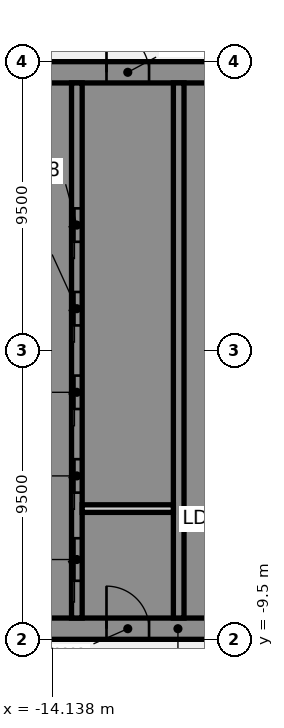
"""IFC4 building model, lengths in metres.
Left out: names, types, materials, properties, quantities, classifications, styles, units other than length and angle.
Written with IfcOpenShell. Run it as: python <this file> out.ifc"""

import sys

from ifc_helpers import new_model, si_unit, direction, frame, frame_2d, origin, place, context, subcontext, project, spatial, polyline, rectangle, outline, extrude, element, fill, save


model = new_model("IFC4")
c1 = context("Model", 3, precision=1e-05, world=origin(), true_north=direction((0.0, 1.0)))
c2 = subcontext(c1, "Body", "Model", "MODEL_VIEW")
j1 = project(units=[si_unit("LENGTHUNIT", "METRE"), si_unit("PLANEANGLEUNIT", "RADIAN")], contexts=[c1])
p1 = place(None, origin())
s1 = spatial("IfcSite", under=j1, at=p1, CompositionType="ELEMENT")
p2 = place(p1, origin())
s2 = spatial("IfcBuilding", under=s1, at=p2, CompositionType="ELEMENT")
p3 = place(p2, frame((0.0, 0.0, 79.0)))
s3 = spatial("IfcBuildingStorey", under=s2, at=p3, CompositionType="ELEMENT", Elevation=79.0)
p4 = place(p3, frame((-16.5, -9.15, 0.0), z_axis=(0.0, 0.0, 1.0), x_axis=(1.0, 0.0, 0.0)))
e1 = element("IfcWall", 1, at=p4, inside=s3, PredefinedType="SHEAR", context=c2, shape_type="SweptSolid", body=[
    extrude(rectangle(XDim=13.0, YDim=0.7, at=frame_2d((6.5, 0.0))), origin(), (0.0, 0.0, 1.0), 4.36),
])
p5 = place(p4, frame((4.15, 0.0, 0.0)))
e2 = element("IfcOpeningElement", 2, at=p5, cuts=e1, PredefinedType="OPENING", context=c2, shape_type="SweptSolid", body=[
    extrude(rectangle(XDim=1.4, YDim=2.1, at=frame_2d((0.7, 1.05))), frame((0.0, 0.36, 0.0), z_axis=(0.0, -1.0, 0.0), x_axis=(1.0, 0.0, 0.0)), (0.0, 0.0, 1.0), 0.72),
])
p6 = place(p4, frame((10.125, 0.0, 0.0)))
e3 = element("IfcOpeningElement", 3, at=p6, cuts=e1, PredefinedType="OPENING", context=c2, shape_type="SweptSolid", body=[
    extrude(rectangle(XDim=1.4, YDim=2.1, at=frame_2d((0.7, 1.05))), frame((0.0, 0.36, 0.0), z_axis=(0.0, -1.0, 0.0), x_axis=(1.0, 0.0, 0.0)), (0.0, 0.0, 1.0), 0.72),
])
p7 = place(p3, origin())
e4 = element("IfcWall", 4, at=p7, inside=s3, PredefinedType="SHEAR", context=c2, shape_type="SweptSolid", body=[
    extrude(outline(polyline([(-13.5, -8.8), (-13.5, -8.125), (-15.8, -8.125), (-15.8, -5.625), (-13.5, -5.625), (-13.5, -5.375), (-15.8, -5.375), (-15.8, -2.875), (-13.5, -2.875), (-13.5, -2.625), (-15.8, -2.625), (-15.8, -0.125), (-13.5, -0.125), (-13.5, 0.125), (-15.8, 0.125), (-15.8, 2.625), (-13.5, 2.625), (-13.5, 2.875), (-15.8, 2.875), (-15.8, 5.375), (-13.5, 5.375), (-13.5, 5.625), (-15.8, 5.625), (-15.8, 8.125), (-13.5, 8.125), (-13.5, 8.8), (-15.8, 8.8), (-16.5, 8.8), (-16.5, -8.8), (-15.8, -8.8), (-13.5, -8.8)])), origin(), (0.0, 0.0, 1.0), 4.36),
])
p8 = place(p3, frame((-16.5, 9.15, 0.0), z_axis=(0.0, 0.0, 1.0), x_axis=(1.0, 0.0, 0.0)))
e5 = element("IfcWall", 5, at=p8, inside=s3, PredefinedType="SHEAR", context=c2, shape_type="SweptSolid", body=[
    extrude(rectangle(XDim=13.0, YDim=0.7, at=frame_2d((6.5, 0.0))), origin(), (0.0, 0.0, 1.0), 4.36),
])
p9 = place(p8, frame((4.15, 0.0, 0.0)))
e6 = element("IfcOpeningElement", 6, at=p9, cuts=e5, PredefinedType="OPENING", context=c2, shape_type="SweptSolid", body=[
    extrude(rectangle(XDim=1.4, YDim=2.1, at=frame_2d((0.7, 1.05))), frame((0.0, 0.36, 0.0), z_axis=(0.0, -1.0, 0.0), x_axis=(1.0, 0.0, 0.0)), (0.0, 0.0, 1.0), 0.72),
])
p10 = place(p3, origin())
e7 = element("IfcWall", 7, at=p10, inside=s3, PredefinedType="SHEAR", context=c2, shape_type="SweptSolid", body=[
    extrude(outline(polyline([(-9.8, -5.375), (-9.8, -5.625), (-7.5, -5.625), (-7.15, -5.625), (-7.15, 8.8), (-7.5, 8.8), (-9.8, 8.8), (-9.8, 8.125), (-7.5, 8.125), (-7.5, 5.625), (-9.8, 5.625), (-9.8, 5.375), (-7.5, 5.375), (-7.5, 2.875), (-9.8, 2.875), (-9.8, 2.625), (-7.5, 2.625), (-7.5, 0.125), (-9.8, 0.125), (-9.8, -0.125), (-7.5, -0.125), (-7.5, -2.625), (-9.8, -2.625), (-9.8, -2.875), (-7.5, -2.875), (-7.5, -5.375), (-9.8, -5.375)])), origin(), (0.0, 0.0, 1.0), 4.36),
])
p11 = place(p3, origin())
e8 = element("IfcWall", 8, at=p11, inside=s3, PredefinedType="SHEAR", context=c2, shape_type="SweptSolid", body=[
    extrude(outline(polyline([(-7.5, -8.125), (-9.55, -8.125), (-9.55, -5.625), (-9.8, -5.625), (-9.8, -8.125), (-9.8, -8.8), (-7.5, -8.8), (-7.5, -8.125)])), origin(), (0.0, 0.0, 1.0), 4.36),
])
p12 = place(p3, frame((-13.325, -8.8, 0.0), z_axis=(0.0, 0.0, 1.0), x_axis=(0.0, 1.0, 0.0)))
e9 = element("IfcWall", 9, at=p12, inside=s3, PredefinedType="SHEAR", context=c2, shape_type="SweptSolid", body=[
    extrude(rectangle(XDim=17.6, YDim=0.35, at=frame_2d((8.8, 0.0))), origin(), (0.0, 0.0, 1.0), 4.36),
])
p13 = place(p12, frame((1.225, 0.0, 0.0)))
e10 = element("IfcOpeningElement", 10, at=p13, cuts=e9, PredefinedType="OPENING", context=c2, shape_type="SweptSolid", body=[
    extrude(rectangle(XDim=1.4, YDim=2.1, at=frame_2d((0.7, 1.05))), frame((0.0, 0.185, 0.0), z_axis=(0.0, -1.0, 0.0), x_axis=(1.0, 0.0, 0.0)), (0.0, 0.0, 1.0), 0.37),
])
p14 = place(p12, frame((4.125, 0.0, 0.0)))
e11 = element("IfcOpeningElement", 11, at=p14, cuts=e9, PredefinedType="OPENING", context=c2, shape_type="SweptSolid", body=[
    extrude(rectangle(XDim=1.1, YDim=2.1, at=frame_2d((0.55, 1.05))), frame((0.0, 0.185, 0.0), z_axis=(0.0, -1.0, 0.0), x_axis=(1.0, 0.0, 0.0)), (0.0, 0.0, 1.0), 0.37),
])
p15 = place(p12, frame((6.875, 0.0, 0.0)))
e12 = element("IfcOpeningElement", 12, at=p15, cuts=e9, PredefinedType="OPENING", context=c2, shape_type="SweptSolid", body=[
    extrude(rectangle(XDim=1.1, YDim=2.1, at=frame_2d((0.55, 1.05))), frame((0.0, 0.185, 0.0), z_axis=(0.0, -1.0, 0.0), x_axis=(1.0, 0.0, 0.0)), (0.0, 0.0, 1.0), 0.37),
])
p16 = place(p12, frame((9.625, 0.0, 0.0)))
e13 = element("IfcOpeningElement", 13, at=p16, cuts=e9, PredefinedType="OPENING", context=c2, shape_type="SweptSolid", body=[
    extrude(rectangle(XDim=1.1, YDim=2.1, at=frame_2d((0.55, 1.05))), frame((0.0, 0.185, 0.0), z_axis=(0.0, -1.0, 0.0), x_axis=(1.0, 0.0, 0.0)), (0.0, 0.0, 1.0), 0.37),
])
p17 = place(p12, frame((12.375, 0.0, 0.0)))
e14 = element("IfcOpeningElement", 14, at=p17, cuts=e9, PredefinedType="OPENING", context=c2, shape_type="SweptSolid", body=[
    extrude(rectangle(XDim=1.1, YDim=2.1, at=frame_2d((0.55, 1.05))), frame((0.0, 0.185, 0.0), z_axis=(0.0, -1.0, 0.0), x_axis=(1.0, 0.0, 0.0)), (0.0, 0.0, 1.0), 0.37),
])
p18 = place(p3, frame((-9.975, -8.8, 0.0), z_axis=(0.0, 0.0, 1.0), x_axis=(0.0, 1.0, 0.0)))
e15 = element("IfcWall", 15, at=p18, inside=s3, PredefinedType="SHEAR", context=c2, shape_type="SweptSolid", body=[
    extrude(rectangle(XDim=17.6, YDim=0.35, at=frame_2d((8.8, 0.0))), origin(), (0.0, 0.0, 1.0), 4.36),
])
p19 = place(p3, frame((-13.15, -5.2, 0.0), z_axis=(0.0, 0.0, 1.0), x_axis=(1.0, 0.0, 0.0)))
e16 = element("IfcWall", 16, at=p19, inside=s3, PredefinedType="PARTITIONING", context=c2, shape_type="SweptSolid", body=[
    extrude(rectangle(XDim=3.0, YDim=0.25, at=frame_2d((1.5, 0.0))), origin(), (0.0, 0.0, 1.0), 4.36),
])
p20 = place(p5, origin())
e17 = element("IfcDoor", 17, at=p20, inside=s3, OperationType="SINGLE_SWING_LEFT", PredefinedType="DOOR", context=c2, shape_type="SweptSolid", body=[
    extrude(rectangle(XDim=1.4, YDim=2.1, at=frame_2d((0.7, 1.05))), frame((0.0, 0.025, 0.0), z_axis=(0.0, -1.0, 0.0), x_axis=(1.0, 0.0, 0.0)), (0.0, 0.0, 1.0), 0.05),
])
fill(e2, e17)
p21 = place(p13, origin())
e18 = element("IfcDoor", 18, at=p21, inside=s3, OperationType="SLIDING_TO_LEFT", PredefinedType="DOOR", context=c2, shape_type="SweptSolid", body=[
    extrude(rectangle(XDim=1.4, YDim=2.1, at=frame_2d((0.7, 1.05))), frame((0.0, 0.025, 0.0), z_axis=(0.0, -1.0, 0.0), x_axis=(1.0, 0.0, 0.0)), (0.0, 0.0, 1.0), 0.05),
])
fill(e10, e18)
p22 = place(p14, origin())
e19 = element("IfcDoor", 19, at=p22, inside=s3, OperationType="SLIDING_TO_LEFT", PredefinedType="DOOR", context=c2, shape_type="SweptSolid", body=[
    extrude(rectangle(XDim=1.1, YDim=2.1, at=frame_2d((0.55, 1.05))), frame((0.0, 0.025, 0.0), z_axis=(0.0, -1.0, 0.0), x_axis=(1.0, 0.0, 0.0)), (0.0, 0.0, 1.0), 0.05),
])
fill(e11, e19)
p23 = place(p15, origin())
e20 = element("IfcDoor", 20, at=p23, inside=s3, OperationType="SLIDING_TO_LEFT", PredefinedType="DOOR", context=c2, shape_type="SweptSolid", body=[
    extrude(rectangle(XDim=1.1, YDim=2.1, at=frame_2d((0.55, 1.05))), frame((0.0, 0.025, 0.0), z_axis=(0.0, -1.0, 0.0), x_axis=(1.0, 0.0, 0.0)), (0.0, 0.0, 1.0), 0.05),
])
fill(e12, e20)
p24 = place(p16, origin())
e21 = element("IfcDoor", 21, at=p24, inside=s3, OperationType="SLIDING_TO_LEFT", PredefinedType="DOOR", context=c2, shape_type="SweptSolid", body=[
    extrude(rectangle(XDim=1.1, YDim=2.1, at=frame_2d((0.55, 1.05))), frame((0.0, 0.025, 0.0), z_axis=(0.0, -1.0, 0.0), x_axis=(1.0, 0.0, 0.0)), (0.0, 0.0, 1.0), 0.05),
])
fill(e13, e21)
p25 = place(p17, origin())
e22 = element("IfcDoor", 22, at=p25, inside=s3, OperationType="SLIDING_TO_LEFT", PredefinedType="DOOR", context=c2, shape_type="SweptSolid", body=[
    extrude(rectangle(XDim=1.1, YDim=2.1, at=frame_2d((0.55, 1.05))), frame((0.0, 0.025, 0.0), z_axis=(0.0, -1.0, 0.0), x_axis=(1.0, 0.0, 0.0)), (0.0, 0.0, 1.0), 0.05),
])
fill(e14, e22)
p26 = place(p9, origin())
e23 = element("IfcDoor", 23, at=p26, inside=s3, OperationType="SINGLE_SWING_LEFT", PredefinedType="DOOR", context=c2, shape_type="SweptSolid", body=[
    extrude(rectangle(XDim=1.4, YDim=2.1, at=frame_2d((0.7, 1.05))), frame((0.0, 0.025, 0.0), z_axis=(0.0, -1.0, 0.0), x_axis=(1.0, 0.0, 0.0)), (0.0, 0.0, 1.0), 0.05),
])
fill(e6, e23)
save(model, sys.argv[1])
